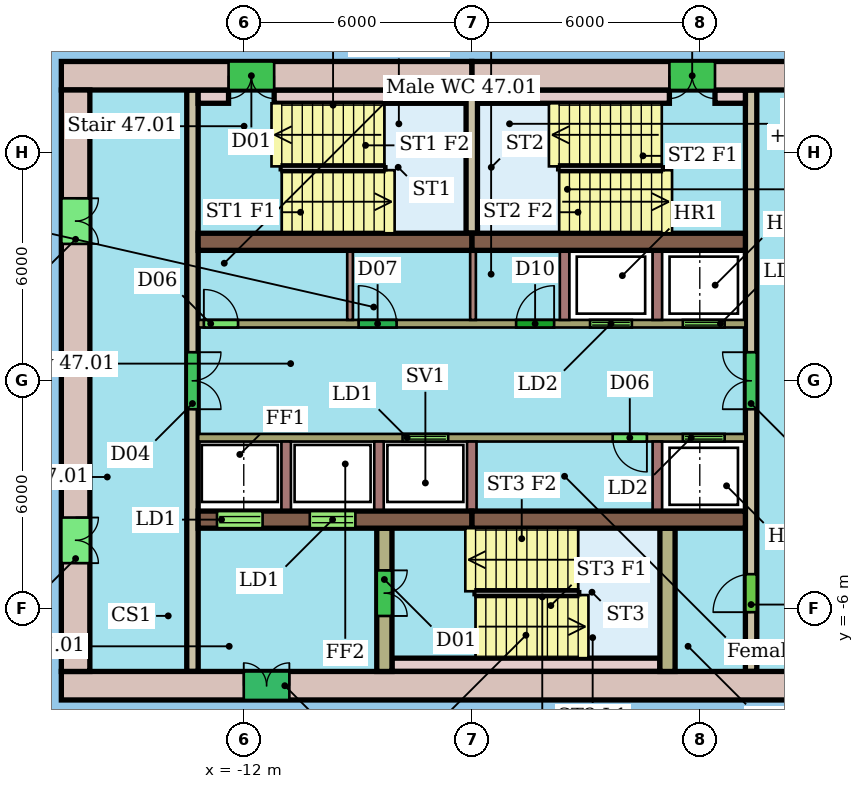
"""IFC4 building model, lengths in metres.
Left out: names, types, materials, properties, quantities, classifications, styles, units other than length and angle.
Written with IfcOpenShell. Run it as: python <this file> out.ifc"""

import sys

from ifc_helpers import new_model, si_unit, direction, frame, frame_2d, origin, place, context, subcontext, project, spatial, rectangle, extrude, element, fill, save


model = new_model("IFC4")
c1 = context("Model", 3, precision=1e-05, world=origin(), true_north=direction((0.0, 1.0)))
c2 = subcontext(c1, "Body", "Model", "MODEL_VIEW")
j1 = project(units=[si_unit("LENGTHUNIT", "METRE"), si_unit("PLANEANGLEUNIT", "RADIAN")], contexts=[c1])
p1 = place(None, origin())
s1 = spatial("IfcSite", under=j1, at=p1, CompositionType="ELEMENT")
p2 = place(p1, origin())
s2 = spatial("IfcBuilding", under=s1, at=p2, CompositionType="ELEMENT")
p3 = place(p2, frame((0.0, 0.0, 195.7)))
s3 = spatial("IfcBuildingStorey", under=s2, at=p3, CompositionType="ELEMENT", Elevation=195.7)
p4 = place(p3, frame((4.8, 8.025, 0.0), z_axis=(0.0, 0.0, 1.0), x_axis=(-1.0, 0.0, 0.0)))
e1 = element("IfcWall", 1, at=p4, inside=s3, PredefinedType="SHEAR", context=c2, shape_type="SweptSolid", body=[
    extrude(rectangle(XDim=10.8, YDim=0.75, at=frame_2d((5.4, 0.0))), origin(), (0.0, 0.0, 1.0), 3.3),
])
p5 = place(p4, frame((4.4, 0.0, 0.0)))
e2 = element("IfcOpeningElement", 2, at=p5, cuts=e1, PredefinedType="OPENING", context=c2, shape_type="SweptSolid", body=[
    extrude(rectangle(XDim=1.2, YDim=2.1, at=frame_2d((0.6, 1.05))), frame((0.0, 0.385, 0.0), z_axis=(0.0, -1.0, 0.0), x_axis=(1.0, 0.0, 0.0)), (0.0, 0.0, 1.0), 0.77),
])
p6 = place(p3, frame((-6.0, 8.025, 0.0), z_axis=(0.0, 0.0, 1.0), x_axis=(-1.0, 0.0, 0.0)))
e3 = element("IfcWall", 3, at=p6, inside=s3, PredefinedType="SHEAR", context=c2, shape_type="SweptSolid", body=[
    extrude(rectangle(XDim=10.8, YDim=0.75, at=frame_2d((5.4, 0.0))), origin(), (0.0, 0.0, 1.0), 3.3),
])
p7 = place(p6, frame((5.2, 0.0, 0.0)))
e4 = element("IfcOpeningElement", 4, at=p7, cuts=e3, PredefinedType="OPENING", context=c2, shape_type="SweptSolid", body=[
    extrude(rectangle(XDim=1.2, YDim=2.1, at=frame_2d((0.6, 1.05))), frame((0.0, 0.385, 0.0), z_axis=(0.0, -1.0, 0.0), x_axis=(1.0, 0.0, 0.0)), (0.0, 0.0, 1.0), 0.77),
])
p8 = place(p3, frame((-16.8, -8.025, 0.0), z_axis=(0.0, 0.0, 1.0), x_axis=(1.0, 0.0, 0.0)))
e5 = element("IfcWall", 5, at=p8, inside=s3, PredefinedType="SHEAR", context=c2, shape_type="SweptSolid", body=[
    extrude(rectangle(XDim=21.6, YDim=0.75, at=frame_2d((10.8, 0.0))), origin(), (0.0, 0.0, 1.0), 3.3),
])
p9 = place(p8, frame((4.8, 0.0, 0.0)))
e6 = element("IfcOpeningElement", 6, at=p9, cuts=e5, PredefinedType="OPENING", context=c2, shape_type="SweptSolid", body=[
    extrude(rectangle(XDim=1.2, YDim=2.1, at=frame_2d((0.6, 1.05))), frame((0.0, 0.385, 0.0), z_axis=(0.0, -1.0, 0.0), x_axis=(1.0, 0.0, 0.0)), (0.0, 0.0, 1.0), 0.77),
])
p10 = place(p3, frame((-16.425, 7.65, 0.0), z_axis=(0.0, 0.0, 1.0), x_axis=(0.0, -1.0, 0.0)))
e7 = element("IfcWall", 7, at=p10, inside=s3, PredefinedType="SHEAR", context=c2, shape_type="SweptSolid", body=[
    extrude(rectangle(XDim=15.3, YDim=0.75, at=frame_2d((7.65, 0.0))), origin(), (0.0, 0.0, 1.0), 3.3),
])
p11 = place(p10, frame((11.25, 0.0, 0.0)))
e8 = element("IfcOpeningElement", 8, at=p11, cuts=e7, PredefinedType="OPENING", context=c2, shape_type="SweptSolid", body=[
    extrude(rectangle(XDim=1.2, YDim=2.1, at=frame_2d((0.6, 1.05))), frame((0.0, 0.385, 0.0), z_axis=(0.0, -1.0, 0.0), x_axis=(1.0, 0.0, 0.0)), (0.0, 0.0, 1.0), 0.77),
])
p12 = place(p10, frame((2.85, 0.0, 0.0)))
e9 = element("IfcOpeningElement", 9, at=p12, cuts=e7, PredefinedType="OPENING", context=c2, shape_type="SweptSolid", body=[
    extrude(rectangle(XDim=1.2, YDim=2.1, at=frame_2d((0.6, 1.05))), frame((0.0, 0.385, 0.0), z_axis=(0.0, -1.0, 0.0), x_axis=(1.0, 0.0, 0.0)), (0.0, 0.0, 1.0), 0.77),
])
for number, where, z_axis, x_axis in (
    (10, (-13.2, 3.655, 0.0), (0.0, 0.0, 1.0), (1.0, 0.0, 0.0)),
    (11, (-6.0, 3.655, 0.0), (0.0, 0.0, 1.0), (1.0, 0.0, 0.0)),
):
    element("IfcWall", number, at=place(p3, frame(where, z_axis=z_axis, x_axis=x_axis)), inside=s3, PredefinedType="SHEAR", context=c2, shape_type="SweptSolid", body=[
        extrude(rectangle(XDim=7.2, YDim=0.45, at=frame_2d((3.6, 0.0))), origin(), (0.0, 0.0, 1.0), 3.3),
    ])
p13 = place(p3, frame((-13.2, -3.655, 0.0), z_axis=(0.0, 0.0, 1.0), x_axis=(1.0, 0.0, 0.0)))
e12 = element("IfcWall", 12, at=p13, inside=s3, PredefinedType="SHEAR", context=c2, shape_type="SweptSolid", body=[
    extrude(rectangle(XDim=7.2, YDim=0.45, at=frame_2d((3.6, 0.0))), origin(), (0.0, 0.0, 1.0), 3.3),
])
p14 = place(p13, frame((0.496, 0.0, 0.0)))
e13 = element("IfcOpeningElement", 13, at=p14, cuts=e12, PredefinedType="OPENING", context=c2, shape_type="SweptSolid", body=[
    extrude(rectangle(XDim=1.2, YDim=2.1, at=frame_2d((0.6, 1.05))), frame((0.0, 0.235, 0.0), z_axis=(0.0, -1.0, 0.0), x_axis=(1.0, 0.0, 0.0)), (0.0, 0.0, 1.0), 0.47),
])
p15 = place(p13, frame((2.938, 0.0, 0.0)))
e14 = element("IfcOpeningElement", 14, at=p15, cuts=e12, PredefinedType="OPENING", context=c2, shape_type="SweptSolid", body=[
    extrude(rectangle(XDim=1.2, YDim=2.1, at=frame_2d((0.6, 1.05))), frame((0.0, 0.235, 0.0), z_axis=(0.0, -1.0, 0.0), x_axis=(1.0, 0.0, 0.0)), (0.0, 0.0, 1.0), 0.47),
])
p16 = place(p3, frame((-6.0, -3.655, 0.0), z_axis=(0.0, 0.0, 1.0), x_axis=(1.0, 0.0, 0.0)))
e15 = element("IfcWall", 15, at=p16, inside=s3, PredefinedType="SHEAR", context=c2, shape_type="SweptSolid", body=[
    extrude(rectangle(XDim=7.2, YDim=0.45, at=frame_2d((3.6, 0.0))), origin(), (0.0, 0.0, 1.0), 3.3),
])
p17 = place(p3, frame((-13.35, 7.65, 0.0), z_axis=(0.0, 0.0, 1.0), x_axis=(0.0, -1.0, 0.0)))
e16 = element("IfcWall", 16, at=p17, inside=s3, PredefinedType="SHEAR", context=c2, shape_type="SweptSolid", body=[
    extrude(rectangle(XDim=15.3, YDim=0.3, at=frame_2d((7.65, 0.0))), origin(), (0.0, 0.0, 1.0), 3.3),
])
p18 = place(p17, frame((6.9, 0.0, 0.0)))
e17 = element("IfcOpeningElement", 17, at=p18, cuts=e16, PredefinedType="OPENING", context=c2, shape_type="SweptSolid", body=[
    extrude(rectangle(XDim=1.5, YDim=2.1, at=frame_2d((0.75, 1.05))), frame((0.0, 0.16, 0.0), z_axis=(0.0, -1.0, 0.0), x_axis=(1.0, 0.0, 0.0)), (0.0, 0.0, 1.0), 0.32),
])
p19 = place(p3, frame((1.35, -7.65, 0.0), z_axis=(0.0, 0.0, 1.0), x_axis=(0.0, 1.0, 0.0)))
e18 = element("IfcWall", 18, at=p19, inside=s3, PredefinedType="SHEAR", context=c2, shape_type="SweptSolid", body=[
    extrude(rectangle(XDim=15.3, YDim=0.3, at=frame_2d((7.65, 0.0))), origin(), (0.0, 0.0, 1.0), 3.3),
])
p20 = place(p19, frame((1.56, 0.0, 0.0)))
e19 = element("IfcOpeningElement", 19, at=p20, cuts=e18, PredefinedType="OPENING", context=c2, shape_type="SweptSolid", body=[
    extrude(rectangle(XDim=1.0, YDim=2.1, at=frame_2d((0.5, 1.05))), frame((0.0, 0.16, 0.0), z_axis=(0.0, -1.0, 0.0), x_axis=(1.0, 0.0, 0.0)), (0.0, 0.0, 1.0), 0.32),
])
p21 = place(p19, frame((6.9, 0.0, 0.0)))
e20 = element("IfcOpeningElement", 20, at=p21, cuts=e18, PredefinedType="OPENING", context=c2, shape_type="SweptSolid", body=[
    extrude(rectangle(XDim=1.5, YDim=2.1, at=frame_2d((0.75, 1.05))), frame((0.0, 0.16, 0.0), z_axis=(0.0, -1.0, 0.0), x_axis=(1.0, 0.0, 0.0)), (0.0, 0.0, 1.0), 0.32),
])
p22 = place(p3, frame((-13.2, 1.5, 0.0), z_axis=(0.0, 0.0, 1.0), x_axis=(1.0, 0.0, 0.0)))
e21 = element("IfcWall", 21, at=p22, inside=s3, PredefinedType="SHEAR", context=c2, shape_type="SweptSolid", body=[
    extrude(rectangle(XDim=14.4, YDim=0.2, at=frame_2d((7.2, 0.0))), origin(), (0.0, 0.0, 1.0), 3.3),
])
p23 = place(p22, frame((10.312, 0.0, 0.0)))
e22 = element("IfcOpeningElement", 22, at=p23, cuts=e21, PredefinedType="OPENING", context=c2, shape_type="SweptSolid", body=[
    extrude(rectangle(XDim=1.1, YDim=2.1, at=frame_2d((0.55, 1.05))), frame((0.0, 0.11, 0.0), z_axis=(0.0, -1.0, 0.0), x_axis=(1.0, 0.0, 0.0)), (0.0, 0.0, 1.0), 0.22),
])
p24 = place(p22, frame((12.754, 0.0, 0.0)))
e23 = element("IfcOpeningElement", 23, at=p24, cuts=e21, PredefinedType="OPENING", context=c2, shape_type="SweptSolid", body=[
    extrude(rectangle(XDim=1.1, YDim=2.1, at=frame_2d((0.55, 1.05))), frame((0.0, 0.11, 0.0), z_axis=(0.0, -1.0, 0.0), x_axis=(1.0, 0.0, 0.0)), (0.0, 0.0, 1.0), 0.22),
])
p25 = place(p22, frame((0.15, 0.0, 0.0)))
e24 = element("IfcOpeningElement", 24, at=p25, cuts=e21, PredefinedType="OPENING", context=c2, shape_type="SweptSolid", body=[
    extrude(rectangle(XDim=0.9, YDim=2.1, at=frame_2d((0.45, 1.05))), frame((0.0, 0.11, 0.0), z_axis=(0.0, -1.0, 0.0), x_axis=(1.0, 0.0, 0.0)), (0.0, 0.0, 1.0), 0.22),
])
p26 = place(p22, frame((4.222, 0.0, 0.0)))
e25 = element("IfcOpeningElement", 25, at=p26, cuts=e21, PredefinedType="OPENING", context=c2, shape_type="SweptSolid", body=[
    extrude(rectangle(XDim=1.0, YDim=2.1, at=frame_2d((0.5, 1.05))), frame((0.0, 0.11, 0.0), z_axis=(0.0, -1.0, 0.0), x_axis=(1.0, 0.0, 0.0)), (0.0, 0.0, 1.0), 0.22),
])
p27 = place(p22, frame((8.367, 0.0, 0.0)))
e26 = element("IfcOpeningElement", 26, at=p27, cuts=e21, PredefinedType="OPENING", context=c2, shape_type="SweptSolid", body=[
    extrude(rectangle(XDim=1.0, YDim=2.1, at=frame_2d((0.5, 1.05))), frame((0.0, 0.11, 0.0), z_axis=(0.0, -1.0, 0.0), x_axis=(1.0, 0.0, 0.0)), (0.0, 0.0, 1.0), 0.22),
])
p28 = place(p3, frame((1.2, -1.5, 0.0), z_axis=(0.0, 0.0, 1.0), x_axis=(-1.0, 0.0, 0.0)))
e27 = element("IfcWall", 27, at=p28, inside=s3, PredefinedType="SHEAR", context=c2, shape_type="SweptSolid", body=[
    extrude(rectangle(XDim=14.4, YDim=0.2, at=frame_2d((7.2, 0.0))), origin(), (0.0, 0.0, 1.0), 3.3),
])
p29 = place(p28, frame((7.821, 0.0, 0.0)))
e28 = element("IfcOpeningElement", 28, at=p29, cuts=e27, PredefinedType="OPENING", context=c2, shape_type="SweptSolid", body=[
    extrude(rectangle(XDim=1.2, YDim=2.1, at=frame_2d((0.6, 1.05))), frame((0.0, 0.11, 0.0), z_axis=(0.0, -1.0, 0.0), x_axis=(1.0, 0.0, 0.0)), (0.0, 0.0, 1.0), 0.22),
])
p30 = place(p28, frame((0.546, 0.0, 0.0)))
e29 = element("IfcOpeningElement", 29, at=p30, cuts=e27, PredefinedType="OPENING", context=c2, shape_type="SweptSolid", body=[
    extrude(rectangle(XDim=1.1, YDim=2.1, at=frame_2d((0.55, 1.05))), frame((0.0, 0.11, 0.0), z_axis=(0.0, -1.0, 0.0), x_axis=(1.0, 0.0, 0.0)), (0.0, 0.0, 1.0), 0.22),
])
p31 = place(p28, frame((2.592, 0.0, 0.0)))
e30 = element("IfcOpeningElement", 30, at=p31, cuts=e27, PredefinedType="OPENING", context=c2, shape_type="SweptSolid", body=[
    extrude(rectangle(XDim=0.9, YDim=2.1, at=frame_2d((0.45, 1.05))), frame((0.0, 0.11, 0.0), z_axis=(0.0, -1.0, 0.0), x_axis=(1.0, 0.0, 0.0)), (0.0, 0.0, 1.0), 0.22),
])
p32 = place(p3, frame((-8.3, -3.88, 0.0), z_axis=(0.0, 0.0, 1.0), x_axis=(0.0, -1.0, 0.0)))
e31 = element("IfcWall", 31, at=p32, inside=s3, PredefinedType="SHEAR", context=c2, shape_type="SweptSolid", body=[
    extrude(rectangle(XDim=3.77, YDim=0.4, at=frame_2d((1.885, 0.0))), origin(), (0.0, 0.0, 1.0), 3.3),
])
p33 = place(p32, frame((1.11, 0.0, 0.0)))
e32 = element("IfcOpeningElement", 32, at=p33, cuts=e31, PredefinedType="OPENING", context=c2, shape_type="SweptSolid", body=[
    extrude(rectangle(XDim=1.2, YDim=2.1, at=frame_2d((0.6, 1.05))), frame((0.0, 0.21, 0.0), z_axis=(0.0, -1.0, 0.0), x_axis=(1.0, 0.0, 0.0)), (0.0, 0.0, 1.0), 0.42),
])
p34 = place(p3, frame((-0.85, -3.88, 0.0), z_axis=(0.0, 0.0, 1.0), x_axis=(0.0, -1.0, 0.0)))
e33 = element("IfcWall", 33, at=p34, inside=s3, PredefinedType="SHEAR", context=c2, shape_type="SweptSolid", body=[
    extrude(rectangle(XDim=3.77, YDim=0.4, at=frame_2d((1.885, 0.0))), origin(), (0.0, 0.0, 1.0), 3.3),
])
p35 = place(p3, frame((-6.0, 3.88, 0.0), z_axis=(0.0, 0.0, 1.0), x_axis=(0.0, 1.0, 0.0)))
e34 = element("IfcWall", 34, at=p35, inside=s3, PredefinedType="SHEAR", context=c2, shape_type="SweptSolid", body=[
    extrude(rectangle(XDim=3.77, YDim=0.3, at=frame_2d((1.885, 0.0))), origin(), (0.0, 0.0, 1.0), 3.3),
])
p36 = place(p3, frame((-13.2, 7.475, 0.0), z_axis=(0.0, 0.0, 1.0), x_axis=(1.0, 0.0, 0.0)))
e35 = element("IfcWall", 35, at=p36, inside=s3, PredefinedType="SHEAR", context=c2, shape_type="SweptSolid", body=[
    extrude(rectangle(XDim=0.8, YDim=0.35, at=frame_2d((0.4, 0.0))), origin(), (0.0, 0.0, 1.0), 3.3),
])
for number, where, z_axis, x_axis in (
    (36, (-11.2, 7.475, 0.0), (0.0, 0.0, 1.0), (1.0, 0.0, 0.0)),
    (37, (-5.85, 7.475, 0.0), (0.0, 0.0, 1.0), (1.0, 0.0, 0.0)),
):
    element("IfcWall", number, at=place(p3, frame(where, z_axis=z_axis, x_axis=x_axis)), inside=s3, PredefinedType="SHEAR", context=c2, shape_type="SweptSolid", body=[
        extrude(rectangle(XDim=5.05, YDim=0.35, at=frame_2d((2.525, 0.0))), origin(), (0.0, 0.0, 1.0), 3.3),
    ])
p37 = place(p3, frame((0.4, 7.475, 0.0), z_axis=(0.0, 0.0, 1.0), x_axis=(1.0, 0.0, 0.0)))
e38 = element("IfcWall", 38, at=p37, inside=s3, PredefinedType="SHEAR", context=c2, shape_type="SweptSolid", body=[
    extrude(rectangle(XDim=0.8, YDim=0.35, at=frame_2d((0.4, 0.0))), origin(), (0.0, 0.0, 1.0), 3.3),
])
p38 = place(p3, frame((-8.1, -7.475, 0.0), z_axis=(0.0, 0.0, 1.0), x_axis=(1.0, 0.0, 0.0)))
e39 = element("IfcWall", 39, at=p38, inside=s3, PredefinedType="SHEAR", context=c2, shape_type="SweptSolid", body=[
    extrude(rectangle(XDim=7.05, YDim=0.35, at=frame_2d((3.525, 0.0))), origin(), (0.0, 0.0, 1.0), 3.3),
])
for number, where, z_axis, x_axis in (
    (40, (-3.558, 1.6, 0.0), (0.0, 0.0, 1.0), (0.0, 1.0, 0.0)),
    (41, (-1.117, 1.6, 0.0), (0.0, 0.0, 1.0), (0.0, 1.0, 0.0)),
):
    element("IfcWall", number, at=place(p3, frame(where, z_axis=z_axis, x_axis=x_axis)), inside=s3, PredefinedType="SHEAR", context=c2, shape_type="SweptSolid", body=[
        extrude(rectangle(XDim=1.83, YDim=0.25, at=frame_2d((0.915, 0.0))), origin(), (0.0, 0.0, 1.0), 3.3),
    ])
for number, where, z_axis, x_axis in (
    (42, (-9.203, 1.6, 0.0), (0.0, 0.0, 1.0), (0.0, 1.0, 0.0)),
    (43, (-5.967, 1.6, 0.0), (0.0, 0.0, 1.0), (0.0, 1.0, 0.0)),
):
    element("IfcWall", number, at=place(p3, frame(where, z_axis=z_axis, x_axis=x_axis)), inside=s3, PredefinedType="PARTITIONING", context=c2, shape_type="SweptSolid", body=[
        extrude(rectangle(XDim=1.83, YDim=0.15, at=frame_2d((0.915, 0.0))), origin(), (0.0, 0.0, 1.0), 3.3),
    ])
for number, where, z_axis, x_axis in (
    (44, (-10.883, -1.6, 0.0), (0.0, 0.0, 1.0), (0.0, -1.0, 0.0)),
    (45, (-8.442, -1.6, 0.0), (0.0, 0.0, 1.0), (0.0, -1.0, 0.0)),
    (46, (-6.0, -1.6, 0.0), (0.0, 0.0, 1.0), (0.0, -1.0, 0.0)),
    (47, (-1.117, -1.6, 0.0), (0.0, 0.0, 1.0), (0.0, -1.0, 0.0)),
):
    element("IfcWall", number, at=place(p3, frame(where, z_axis=z_axis, x_axis=x_axis)), inside=s3, PredefinedType="SHEAR", context=c2, shape_type="SweptSolid", body=[
        extrude(rectangle(XDim=1.83, YDim=0.25, at=frame_2d((0.915, 0.0))), origin(), (0.0, 0.0, 1.0), 3.3),
    ])
p39 = place(p5, origin())
e48 = element("IfcDoor", 48, at=p39, inside=s3, OperationType="DOUBLE_DOOR_SINGLE_SWING", PredefinedType="NOTDEFINED", context=c2, shape_type="SweptSolid", body=[
    extrude(rectangle(XDim=1.2, YDim=2.1, at=frame_2d((0.6, 1.05))), frame((0.0, 0.025, 0.0), z_axis=(0.0, -1.0, 0.0), x_axis=(1.0, 0.0, 0.0)), (0.0, 0.0, 1.0), 0.05),
])
fill(e2, e48)
p40 = place(p7, origin())
e49 = element("IfcDoor", 49, at=p40, inside=s3, OperationType="DOUBLE_DOOR_SINGLE_SWING", PredefinedType="NOTDEFINED", context=c2, shape_type="SweptSolid", body=[
    extrude(rectangle(XDim=1.2, YDim=2.1, at=frame_2d((0.6, 1.05))), frame((0.0, 0.025, 0.0), z_axis=(0.0, -1.0, 0.0), x_axis=(1.0, 0.0, 0.0)), (0.0, 0.0, 1.0), 0.05),
])
fill(e4, e49)
p41 = place(p9, origin())
e50 = element("IfcDoor", 50, at=p41, inside=s3, OperationType="DOUBLE_DOOR_SINGLE_SWING", PredefinedType="NOTDEFINED", context=c2, shape_type="SweptSolid", body=[
    extrude(rectangle(XDim=1.2, YDim=2.1, at=frame_2d((0.6, 1.05))), frame((0.0, 0.025, 0.0), z_axis=(0.0, -1.0, 0.0), x_axis=(1.0, 0.0, 0.0)), (0.0, 0.0, 1.0), 0.05),
])
fill(e6, e50)
p42 = place(p11, origin())
e51 = element("IfcDoor", 51, at=p42, inside=s3, OperationType="DOUBLE_DOOR_SINGLE_SWING", PredefinedType="NOTDEFINED", context=c2, shape_type="SweptSolid", body=[
    extrude(rectangle(XDim=1.2, YDim=2.1, at=frame_2d((0.6, 1.05))), frame((0.0, 0.025, 0.0), z_axis=(0.0, -1.0, 0.0), x_axis=(1.0, 0.0, 0.0)), (0.0, 0.0, 1.0), 0.05),
])
fill(e8, e51)
p43 = place(p12, origin())
e52 = element("IfcDoor", 52, at=p43, inside=s3, OperationType="DOUBLE_DOOR_SINGLE_SWING", PredefinedType="NOTDEFINED", context=c2, shape_type="SweptSolid", body=[
    extrude(rectangle(XDim=1.2, YDim=2.1, at=frame_2d((0.6, 1.05))), frame((0.0, 0.025, 0.0), z_axis=(0.0, -1.0, 0.0), x_axis=(1.0, 0.0, 0.0)), (0.0, 0.0, 1.0), 0.05),
])
fill(e9, e52)
p44 = place(p14, origin())
e53 = element("IfcDoor", 53, at=p44, inside=s3, OperationType="DOUBLE_DOOR_SLIDING", PredefinedType="NOTDEFINED", context=c2, shape_type="SweptSolid", body=[
    extrude(rectangle(XDim=1.2, YDim=2.1, at=frame_2d((0.6, 1.05))), frame((0.0, 0.025, 0.0), z_axis=(0.0, -1.0, 0.0), x_axis=(1.0, 0.0, 0.0)), (0.0, 0.0, 1.0), 0.05),
])
fill(e13, e53)
p45 = place(p15, origin())
e54 = element("IfcDoor", 54, at=p45, inside=s3, OperationType="DOUBLE_DOOR_SLIDING", PredefinedType="NOTDEFINED", context=c2, shape_type="SweptSolid", body=[
    extrude(rectangle(XDim=1.2, YDim=2.1, at=frame_2d((0.6, 1.05))), frame((0.0, 0.025, 0.0), z_axis=(0.0, -1.0, 0.0), x_axis=(1.0, 0.0, 0.0)), (0.0, 0.0, 1.0), 0.05),
])
fill(e14, e54)
p46 = place(p18, origin())
e55 = element("IfcDoor", 55, at=p46, inside=s3, OperationType="DOUBLE_DOOR_SINGLE_SWING", PredefinedType="NOTDEFINED", context=c2, shape_type="SweptSolid", body=[
    extrude(rectangle(XDim=1.5, YDim=2.1, at=frame_2d((0.75, 1.05))), frame((0.0, 0.025, 0.0), z_axis=(0.0, -1.0, 0.0), x_axis=(1.0, 0.0, 0.0)), (0.0, 0.0, 1.0), 0.05),
])
fill(e17, e55)
p47 = place(p20, origin())
e56 = element("IfcDoor", 56, at=p47, inside=s3, OperationType="SINGLE_SWING_LEFT", PredefinedType="NOTDEFINED", context=c2, shape_type="SweptSolid", body=[
    extrude(rectangle(XDim=1.0, YDim=2.1, at=frame_2d((0.5, 1.05))), frame((0.0, 0.025, 0.0), z_axis=(0.0, -1.0, 0.0), x_axis=(1.0, 0.0, 0.0)), (0.0, 0.0, 1.0), 0.05),
])
fill(e19, e56)
p48 = place(p21, origin())
e57 = element("IfcDoor", 57, at=p48, inside=s3, OperationType="DOUBLE_DOOR_SINGLE_SWING", PredefinedType="NOTDEFINED", context=c2, shape_type="SweptSolid", body=[
    extrude(rectangle(XDim=1.5, YDim=2.1, at=frame_2d((0.75, 1.05))), frame((0.0, 0.025, 0.0), z_axis=(0.0, -1.0, 0.0), x_axis=(1.0, 0.0, 0.0)), (0.0, 0.0, 1.0), 0.05),
])
fill(e20, e57)
p49 = place(p23, origin())
e58 = element("IfcDoor", 58, at=p49, inside=s3, OperationType="DOUBLE_DOOR_SLIDING", PredefinedType="NOTDEFINED", context=c2, shape_type="SweptSolid", body=[
    extrude(rectangle(XDim=1.1, YDim=2.1, at=frame_2d((0.55, 1.05))), frame((0.0, 0.025, 0.0), z_axis=(0.0, -1.0, 0.0), x_axis=(1.0, 0.0, 0.0)), (0.0, 0.0, 1.0), 0.05),
])
fill(e22, e58)
p50 = place(p24, origin())
e59 = element("IfcDoor", 59, at=p50, inside=s3, OperationType="DOUBLE_DOOR_SLIDING", PredefinedType="NOTDEFINED", context=c2, shape_type="SweptSolid", body=[
    extrude(rectangle(XDim=1.1, YDim=2.1, at=frame_2d((0.55, 1.05))), frame((0.0, 0.025, 0.0), z_axis=(0.0, -1.0, 0.0), x_axis=(1.0, 0.0, 0.0)), (0.0, 0.0, 1.0), 0.05),
])
fill(e23, e59)
p51 = place(p25, origin())
e60 = element("IfcDoor", 60, at=p51, inside=s3, OperationType="SINGLE_SWING_LEFT", PredefinedType="NOTDEFINED", context=c2, shape_type="SweptSolid", body=[
    extrude(rectangle(XDim=0.9, YDim=2.1, at=frame_2d((0.45, 1.05))), frame((0.0, 0.025, 0.0), z_axis=(0.0, -1.0, 0.0), x_axis=(1.0, 0.0, 0.0)), (0.0, 0.0, 1.0), 0.05),
])
fill(e24, e60)
p52 = place(p26, origin())
e61 = element("IfcDoor", 61, at=p52, inside=s3, OperationType="SINGLE_SWING_LEFT", PredefinedType="NOTDEFINED", context=c2, shape_type="SweptSolid", body=[
    extrude(rectangle(XDim=1.0, YDim=2.1, at=frame_2d((0.5, 1.05))), frame((0.0, 0.025, 0.0), z_axis=(0.0, -1.0, 0.0), x_axis=(1.0, 0.0, 0.0)), (0.0, 0.0, 1.0), 0.05),
])
fill(e25, e61)
p53 = place(p27, origin())
e62 = element("IfcDoor", 62, at=p53, inside=s3, OperationType="SINGLE_SWING_RIGHT", PredefinedType="NOTDEFINED", context=c2, shape_type="SweptSolid", body=[
    extrude(rectangle(XDim=1.0, YDim=2.1, at=frame_2d((0.5, 1.05))), frame((0.0, 0.025, 0.0), z_axis=(0.0, -1.0, 0.0), x_axis=(1.0, 0.0, 0.0)), (0.0, 0.0, 1.0), 0.05),
])
fill(e26, e62)
p54 = place(p29, origin())
e63 = element("IfcDoor", 63, at=p54, inside=s3, OperationType="DOUBLE_DOOR_SLIDING", PredefinedType="NOTDEFINED", context=c2, shape_type="SweptSolid", body=[
    extrude(rectangle(XDim=1.2, YDim=2.1, at=frame_2d((0.6, 1.05))), frame((0.0, 0.025, 0.0), z_axis=(0.0, -1.0, 0.0), x_axis=(1.0, 0.0, 0.0)), (0.0, 0.0, 1.0), 0.05),
])
fill(e28, e63)
p55 = place(p30, origin())
e64 = element("IfcDoor", 64, at=p55, inside=s3, OperationType="DOUBLE_DOOR_SLIDING", PredefinedType="NOTDEFINED", context=c2, shape_type="SweptSolid", body=[
    extrude(rectangle(XDim=1.1, YDim=2.1, at=frame_2d((0.55, 1.05))), frame((0.0, 0.025, 0.0), z_axis=(0.0, -1.0, 0.0), x_axis=(1.0, 0.0, 0.0)), (0.0, 0.0, 1.0), 0.05),
])
fill(e29, e64)
p56 = place(p31, origin())
e65 = element("IfcDoor", 65, at=p56, inside=s3, OperationType="SINGLE_SWING_LEFT", PredefinedType="NOTDEFINED", context=c2, shape_type="SweptSolid", body=[
    extrude(rectangle(XDim=0.9, YDim=2.1, at=frame_2d((0.45, 1.05))), frame((0.0, 0.025, 0.0), z_axis=(0.0, -1.0, 0.0), x_axis=(1.0, 0.0, 0.0)), (0.0, 0.0, 1.0), 0.05),
])
fill(e30, e65)
p57 = place(p33, origin())
e66 = element("IfcDoor", 66, at=p57, inside=s3, OperationType="DOUBLE_DOOR_SINGLE_SWING", PredefinedType="NOTDEFINED", context=c2, shape_type="SweptSolid", body=[
    extrude(rectangle(XDim=1.2, YDim=2.1, at=frame_2d((0.6, 1.05))), frame((0.0, 0.025, 0.0), z_axis=(0.0, -1.0, 0.0), x_axis=(1.0, 0.0, 0.0)), (0.0, 0.0, 1.0), 0.05),
])
fill(e32, e66)
save(model, sys.argv[1])
